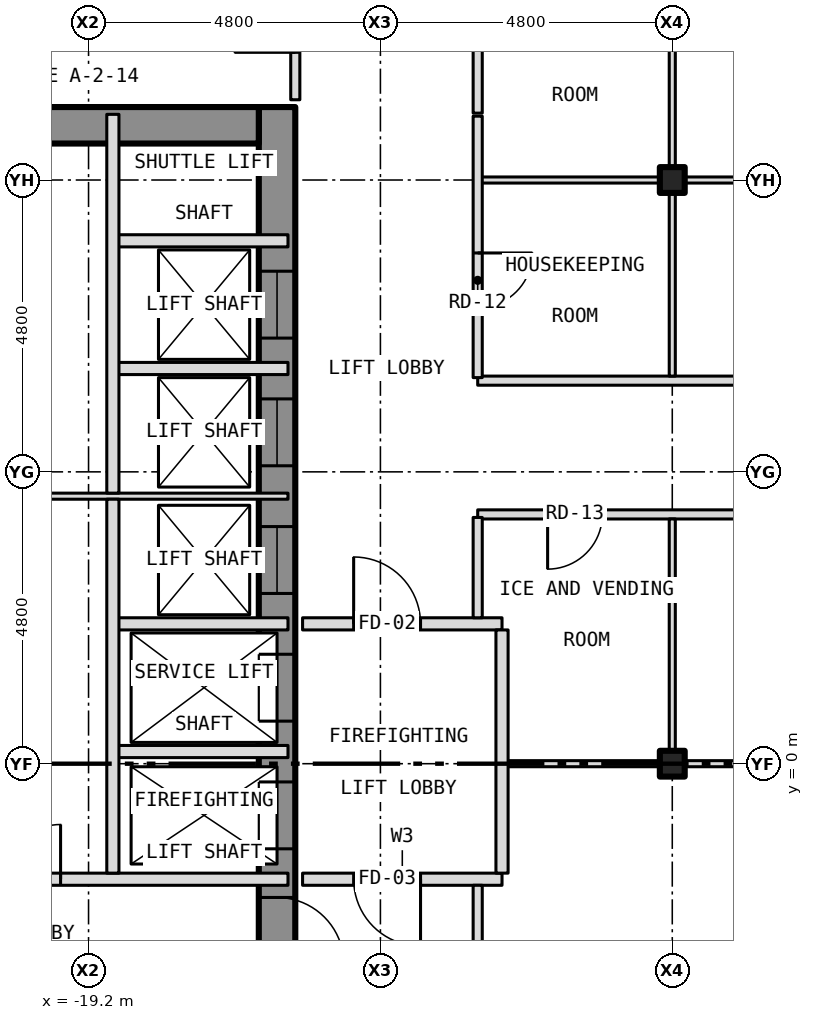
"""IFC4 building model, lengths in metres.
Left out: names, types, materials, properties, quantities, classifications, styles, units other than length and angle.
Written with IfcOpenShell. Run it as: python <this file> out.ifc"""

import sys

from ifc_helpers import new_model, si_unit, direction, frame, frame_2d, origin, origin_2d, place, context, subcontext, project, spatial, rectangle, i_section, extrude, element, fill, save


model = new_model("IFC4")
c1 = context("Model", 3, precision=1e-05, world=origin(), true_north=direction((0.0, 1.0)))
c2 = subcontext(c1, "Body", "Model", "MODEL_VIEW")
j1 = project(units=[si_unit("LENGTHUNIT", "METRE"), si_unit("PLANEANGLEUNIT", "RADIAN")], contexts=[c1])
p1 = place(None, origin())
s1 = spatial("IfcSite", under=j1, at=p1, CompositionType="ELEMENT")
p2 = place(p1, origin())
s2 = spatial("IfcBuilding", under=s1, at=p2, CompositionType="ELEMENT")
p3 = place(p2, frame((0.0, 0.0, 53.0)))
s3 = spatial("IfcBuildingStorey", under=s2, at=p3, CompositionType="ELEMENT", Elevation=53.0)
for number, where, z_axis, x_axis in (
    (1, (-9.6, 0.0, -0.15), (0.0, 0.0, 1.0), (1.0, 0.0, 0.0)),
    (2, (-9.6, 9.6, -0.15), (0.0, 0.0, 1.0), (1.0, 0.0, 0.0)),
):
    element("IfcColumn", number, at=place(p3, frame(where, z_axis=z_axis, x_axis=x_axis)), inside=s3, PredefinedType="COLUMN", context=c2, shape_type="SweptSolid", body=[
        extrude(i_section(OverallWidth=0.409, OverallDepth=0.424, WebThickness=0.033, FlangeThickness=0.052, at=origin_2d()), origin(), (0.0, 0.0, 1.0), 3.5),
    ])
p4 = place(p3, frame((-16.1, -10.8, 0.0), z_axis=(0.0, 0.0, 1.0), x_axis=(0.0, 1.0, 0.0)))
e3 = element("IfcWall", 3, at=p4, inside=s3, PredefinedType="SHEAR", context=c2, shape_type="SweptSolid", body=[
    extrude(rectangle(XDim=21.6, YDim=0.6, at=frame_2d((10.8, 0.0))), origin(), (0.0, 0.0, 1.0), 3.25),
])
p5 = place(p4, frame((9.4, 0.0, 0.0)))
e4 = element("IfcOpeningElement", 4, at=p5, cuts=e3, PredefinedType="OPENING", context=c2, shape_type="SweptSolid", body=[
    extrude(rectangle(XDim=1.1, YDim=2.1, at=frame_2d((0.55, 1.05))), frame((0.0, 0.312, 0.0), z_axis=(0.0, -1.0, 0.0), x_axis=(1.0, 0.0, 0.0)), (0.0, 0.0, 1.0), 0.624),
])
p6 = place(p4, frame((11.5, 0.0, 0.0)))
e5 = element("IfcOpeningElement", 5, at=p6, cuts=e3, PredefinedType="OPENING", context=c2, shape_type="SweptSolid", body=[
    extrude(rectangle(XDim=1.1, YDim=2.1, at=frame_2d((0.55, 1.05))), frame((0.0, 0.312, 0.0), z_axis=(0.0, -1.0, 0.0), x_axis=(1.0, 0.0, 0.0)), (0.0, 0.0, 1.0), 0.624),
])
p7 = place(p4, frame((13.6, 0.0, 0.0)))
e6 = element("IfcOpeningElement", 6, at=p7, cuts=e3, PredefinedType="OPENING", context=c2, shape_type="SweptSolid", body=[
    extrude(rectangle(XDim=1.1, YDim=2.1, at=frame_2d((0.55, 1.05))), frame((0.0, 0.312, 0.0), z_axis=(0.0, -1.0, 0.0), x_axis=(1.0, 0.0, 0.0)), (0.0, 0.0, 1.0), 0.624),
])
p8 = place(p4, frame((15.7, 0.0, 0.0)))
e7 = element("IfcOpeningElement", 7, at=p8, cuts=e3, PredefinedType="OPENING", context=c2, shape_type="SweptSolid", body=[
    extrude(rectangle(XDim=1.1, YDim=2.1, at=frame_2d((0.55, 1.05))), frame((0.0, 0.312, 0.0), z_axis=(0.0, -1.0, 0.0), x_axis=(1.0, 0.0, 0.0)), (0.0, 0.0, 1.0), 0.624),
])
p9 = place(p4, frame((17.8, 0.0, 0.0)))
e8 = element("IfcOpeningElement", 8, at=p9, cuts=e3, PredefinedType="OPENING", context=c2, shape_type="SweptSolid", body=[
    extrude(rectangle(XDim=1.1, YDim=2.1, at=frame_2d((0.55, 1.05))), frame((0.0, 0.312, 0.0), z_axis=(0.0, -1.0, 0.0), x_axis=(1.0, 0.0, 0.0)), (0.0, 0.0, 1.0), 0.624),
])
p10 = place(p4, frame((0.758, 0.0, 0.0)))
e9 = element("IfcOpeningElement", 9, at=p10, cuts=e3, PredefinedType="OPENING", context=c2, shape_type="SweptSolid", body=[
    extrude(rectangle(XDim=1.1, YDim=2.1, at=frame_2d((0.55, 1.05))), frame((0.0, 0.312, 0.0), z_axis=(0.0, -1.0, 0.0), x_axis=(1.0, 0.0, 0.0)), (0.0, 0.0, 1.0), 0.624),
])
p11 = place(p4, frame((7.5, 0.0, 0.0)))
e10 = element("IfcOpeningElement", 10, at=p11, cuts=e3, PredefinedType="OPENING", context=c2, shape_type="SweptSolid", body=[
    extrude(rectangle(XDim=1.1, YDim=2.1, at=frame_2d((0.55, 1.05))), frame((0.0, 0.312, 0.0), z_axis=(0.0, -1.0, 0.0), x_axis=(1.0, 0.0, 0.0)), (0.0, 0.0, 1.0), 0.624),
])
p12 = place(p3, frame((-23.4, 10.5, 0.0), z_axis=(0.0, 0.0, 1.0), x_axis=(1.0, 0.0, 0.0)))
e11 = element("IfcWall", 11, at=p12, inside=s3, PredefinedType="SHEAR", context=c2, shape_type="SweptSolid", body=[
    extrude(rectangle(XDim=7.0, YDim=0.6, at=frame_2d((3.5, 0.0))), origin(), (0.0, 0.0, 1.0), 3.25),
])
p13 = place(p3, frame((-23.88, -1.9, 0.0), z_axis=(0.0, 0.0, 1.0), x_axis=(1.0, 0.0, 0.0)))
e12 = element("IfcWall", 12, at=p13, inside=s3, PredefinedType="PARTITIONING", context=c2, shape_type="SweptSolid", body=[
    extrude(rectangle(XDim=7.96, YDim=0.2, at=frame_2d((3.98, 0.0))), origin(), (0.0, 0.0, 1.0), 3.25),
])
p14 = place(p13, frame((3.32, 0.0, 0.0)))
e13 = element("IfcOpeningElement", 13, at=p14, cuts=e12, PredefinedType="OPENING", context=c2, shape_type="SweptSolid", body=[
    extrude(rectangle(XDim=0.9, YDim=2.1, at=frame_2d((0.45, 1.05))), frame((0.0, 0.112, 0.0), z_axis=(0.0, -1.0, 0.0), x_axis=(1.0, 0.0, 0.0)), (0.0, 0.0, 1.0), 0.224),
])
p15 = place(p3, frame((-15.68, -1.9, 0.0), z_axis=(0.0, 0.0, 1.0), x_axis=(1.0, 0.0, 0.0)))
e14 = element("IfcWall", 14, at=p15, inside=s3, PredefinedType="PARTITIONING", context=c2, shape_type="SweptSolid", body=[
    extrude(rectangle(XDim=3.28, YDim=0.2, at=frame_2d((1.64, 0.0))), origin(), (0.0, 0.0, 1.0), 3.35),
])
p16 = place(p15, frame((0.84, 0.0, 0.0)))
e15 = element("IfcOpeningElement", 15, at=p16, cuts=e14, PredefinedType="OPENING", context=c2, shape_type="SweptSolid", body=[
    extrude(rectangle(XDim=1.1, YDim=2.1, at=frame_2d((0.55, 1.05))), frame((0.0, 0.112, 0.0), z_axis=(0.0, -1.0, 0.0), x_axis=(1.0, 0.0, 0.0)), (0.0, 0.0, 1.0), 0.224),
])
p17 = place(p3, frame((-12.4, 0.0, 0.0), z_axis=(0.0, 0.0, 1.0), x_axis=(1.0, 0.0, 0.0)))
e16 = element("IfcWall", 16, at=p17, inside=s3, PredefinedType="PARTITIONING", context=c2, shape_type="SweptSolid", body=[
    extrude(rectangle(XDim=2.596, YDim=0.1, at=frame_2d((1.298, 0.0))), origin(), (0.0, 0.0, 1.0), 2.728),
])
p18 = place(p3, frame((-9.804, 0.0, 0.0), z_axis=(0.0, 0.0, 1.0), x_axis=(1.0, 0.0, 0.0)))
e17 = element("IfcWall", 17, at=p18, inside=s3, PredefinedType="PARTITIONING", context=c2, shape_type="SweptSolid", body=[
    extrude(rectangle(XDim=0.408, YDim=0.1, at=frame_2d((0.204, 0.0))), origin(), (0.0, 0.0, 1.0), 3.35),
])
p19 = place(p3, frame((-9.396, 0.0, 0.0), z_axis=(0.0, 0.0, 1.0), x_axis=(1.0, 0.0, 0.0)))
e18 = element("IfcWall", 18, at=p19, inside=s3, PredefinedType="PARTITIONING", context=c2, shape_type="SweptSolid", body=[
    extrude(rectangle(XDim=9.192, YDim=0.1, at=frame_2d((4.596, 0.0))), origin(), (0.0, 0.0, 1.0), 2.728),
])
for number, where, z_axis, x_axis in (
    (19, (-18.8, 0.2, 0.0), (0.0, 0.0, 1.0), (1.0, 0.0, 0.0)),
    (20, (-18.8, 2.3, 0.0), (0.0, 0.0, 1.0), (1.0, 0.0, 0.0)),
):
    element("IfcWall", number, at=place(p3, frame(where, z_axis=z_axis, x_axis=x_axis)), inside=s3, PredefinedType="PARTITIONING", context=c2, shape_type="SweptSolid", body=[
        extrude(rectangle(XDim=2.88, YDim=0.2, at=frame_2d((1.44, 0.0))), origin(), (0.0, 0.0, 1.0), 3.25),
    ])
p20 = place(p3, frame((-15.68, 2.3, 0.0), z_axis=(0.0, 0.0, 1.0), x_axis=(1.0, 0.0, 0.0)))
e21 = element("IfcWall", 21, at=p20, inside=s3, PredefinedType="PARTITIONING", context=c2, shape_type="SweptSolid", body=[
    extrude(rectangle(XDim=3.28, YDim=0.2, at=frame_2d((1.64, 0.0))), origin(), (0.0, 0.0, 1.0), 3.35),
])
p21 = place(p20, frame((0.84, 0.0, 0.0)))
e22 = element("IfcOpeningElement", 22, at=p21, cuts=e21, PredefinedType="OPENING", context=c2, shape_type="SweptSolid", body=[
    extrude(rectangle(XDim=1.1, YDim=2.1, at=frame_2d((0.55, 1.05))), frame((0.0, 0.112, 0.0), z_axis=(0.0, -1.0, 0.0), x_axis=(1.0, 0.0, 0.0)), (0.0, 0.0, 1.0), 0.224),
])
p22 = place(p3, frame((-12.8, 4.1, 0.0), z_axis=(0.0, 0.0, 1.0), x_axis=(1.0, 0.0, 0.0)))
e23 = element("IfcWall", 23, at=p22, inside=s3, PredefinedType="PARTITIONING", context=c2, shape_type="SweptSolid", body=[
    extrude(rectangle(XDim=16.9, YDim=0.15, at=frame_2d((8.45, 0.0))), origin(), (0.0, 0.0, 1.0), 3.35),
])
p23 = place(p22, frame((1.15, 0.0, 0.0)))
e24 = element("IfcOpeningElement", 24, at=p23, cuts=e23, PredefinedType="OPENING", context=c2, shape_type="SweptSolid", body=[
    extrude(rectangle(XDim=0.9, YDim=2.1, at=frame_2d((0.45, 1.05))), frame((0.0, 0.087, 0.0), z_axis=(0.0, -1.0, 0.0), x_axis=(1.0, 0.0, 0.0)), (0.0, 0.0, 1.0), 0.174),
])
p24 = place(p22, frame((14.4, 0.0, 0.0)))
e25 = element("IfcOpeningElement", 25, at=p24, cuts=e23, PredefinedType="OPENING", context=c2, shape_type="SweptSolid", body=[
    extrude(rectangle(XDim=0.9, YDim=2.1, at=frame_2d((0.45, 1.05))), frame((0.0, 0.087, 0.0), z_axis=(0.0, -1.0, 0.0), x_axis=(1.0, 0.0, 0.0)), (0.0, 0.0, 1.0), 0.174),
])
p25 = place(p22, frame((7.55, 0.0, 0.0)))
e26 = element("IfcOpeningElement", 26, at=p25, cuts=e23, PredefinedType="OPENING", context=c2, shape_type="SweptSolid", body=[
    extrude(rectangle(XDim=0.9, YDim=2.1, at=frame_2d((0.45, 1.05))), frame((0.0, 0.087, 0.0), z_axis=(0.0, -1.0, 0.0), x_axis=(1.0, 0.0, 0.0)), (0.0, 0.0, 1.0), 0.174),
])
p26 = place(p3, frame((-23.88, 4.4, 0.0), z_axis=(0.0, 0.0, 1.0), x_axis=(1.0, 0.0, 0.0)))
e27 = element("IfcWall", 27, at=p26, inside=s3, PredefinedType="PARTITIONING", context=c2, shape_type="SweptSolid", body=[
    extrude(rectangle(XDim=7.96, YDim=0.1, at=frame_2d((3.98, 0.0))), origin(), (0.0, 0.0, 1.0), 3.25),
])
p27 = place(p26, frame((2.03, 0.0, 0.0)))
e28 = element("IfcOpeningElement", 28, at=p27, cuts=e27, PredefinedType="OPENING", context=c2, shape_type="SweptSolid", body=[
    extrude(rectangle(XDim=0.9, YDim=2.1, at=frame_2d((0.45, 1.05))), frame((0.0, 0.062, 0.0), z_axis=(0.0, -1.0, 0.0), x_axis=(1.0, 0.0, 0.0)), (0.0, 0.0, 1.0), 0.124),
])
p28 = place(p3, frame((-12.8, 6.3, 0.0), z_axis=(0.0, 0.0, 1.0), x_axis=(1.0, 0.0, 0.0)))
e29 = element("IfcWall", 29, at=p28, inside=s3, PredefinedType="PARTITIONING", context=c2, shape_type="SweptSolid", body=[
    extrude(rectangle(XDim=16.9, YDim=0.15, at=frame_2d((8.45, 0.0))), origin(), (0.0, 0.0, 1.0), 3.35),
])
p29 = place(p28, frame((14.4, 0.0, 0.0)))
e30 = element("IfcOpeningElement", 30, at=p29, cuts=e29, PredefinedType="OPENING", context=c2, shape_type="SweptSolid", body=[
    extrude(rectangle(XDim=0.9, YDim=2.1, at=frame_2d((0.45, 1.05))), frame((0.0, 0.087, 0.0), z_axis=(0.0, -1.0, 0.0), x_axis=(1.0, 0.0, 0.0)), (0.0, 0.0, 1.0), 0.174),
])
p30 = place(p28, frame((7.55, 0.0, 0.0)))
e31 = element("IfcOpeningElement", 31, at=p30, cuts=e29, PredefinedType="OPENING", context=c2, shape_type="SweptSolid", body=[
    extrude(rectangle(XDim=0.9, YDim=2.1, at=frame_2d((0.45, 1.05))), frame((0.0, 0.087, 0.0), z_axis=(0.0, -1.0, 0.0), x_axis=(1.0, 0.0, 0.0)), (0.0, 0.0, 1.0), 0.174),
])
for number, where, z_axis, x_axis in (
    (32, (-18.8, 6.5, 0.0), (0.0, 0.0, 1.0), (1.0, 0.0, 0.0)),
    (33, (-18.8, 8.6, 0.0), (0.0, 0.0, 1.0), (1.0, 0.0, 0.0)),
):
    element("IfcWall", number, at=place(p3, frame(where, z_axis=z_axis, x_axis=x_axis)), inside=s3, PredefinedType="PARTITIONING", context=c2, shape_type="SweptSolid", body=[
        extrude(rectangle(XDim=2.88, YDim=0.2, at=frame_2d((1.44, 0.0))), origin(), (0.0, 0.0, 1.0), 3.25),
    ])
p31 = place(p3, frame((-12.8, 9.6, 0.0), z_axis=(0.0, 0.0, 1.0), x_axis=(1.0, 0.0, 0.0)))
e34 = element("IfcWall", 34, at=p31, inside=s3, PredefinedType="PARTITIONING", context=c2, shape_type="SweptSolid", body=[
    extrude(rectangle(XDim=2.996, YDim=0.1, at=frame_2d((1.498, 0.0))), origin(), (0.0, 0.0, 1.0), 2.728),
])
p32 = place(p3, frame((-9.804, 9.6, 0.0), z_axis=(0.0, 0.0, 1.0), x_axis=(1.0, 0.0, 0.0)))
e35 = element("IfcWall", 35, at=p32, inside=s3, PredefinedType="PARTITIONING", context=c2, shape_type="SweptSolid", body=[
    extrude(rectangle(XDim=0.408, YDim=0.1, at=frame_2d((0.204, 0.0))), origin(), (0.0, 0.0, 1.0), 3.35),
])
p33 = place(p3, frame((-9.396, 9.6, 0.0), z_axis=(0.0, 0.0, 1.0), x_axis=(1.0, 0.0, 0.0)))
e36 = element("IfcWall", 36, at=p33, inside=s3, PredefinedType="PARTITIONING", context=c2, shape_type="SweptSolid", body=[
    extrude(rectangle(XDim=9.192, YDim=0.1, at=frame_2d((4.596, 0.0))), origin(), (0.0, 0.0, 1.0), 2.728),
])
p34 = place(p3, frame((-18.8, -1.8, 0.0), z_axis=(0.0, 0.0, 1.0), x_axis=(0.0, 1.0, 0.0)))
e37 = element("IfcWall", 37, at=p34, inside=s3, PredefinedType="PARTITIONING", context=c2, shape_type="SweptSolid", body=[
    extrude(rectangle(XDim=6.15, YDim=0.2, at=frame_2d((3.075, 0.0))), origin(), (0.0, 0.0, 1.0), 3.25),
])
p35 = place(p3, frame((-18.8, 4.45, 0.0), z_axis=(0.0, 0.0, 1.0), x_axis=(0.0, 1.0, 0.0)))
e38 = element("IfcWall", 38, at=p35, inside=s3, PredefinedType="PARTITIONING", context=c2, shape_type="SweptSolid", body=[
    extrude(rectangle(XDim=6.23, YDim=0.2, at=frame_2d((3.115, 0.0))), origin(), (0.0, 0.0, 1.0), 3.25),
])
p36 = place(p3, frame((-15.8, 10.92, 0.0), z_axis=(0.0, 0.0, 1.0), x_axis=(0.0, 1.0, 0.0)))
e39 = element("IfcWall", 39, at=p36, inside=s3, PredefinedType="PARTITIONING", context=c2, shape_type="SweptSolid", body=[
    extrude(rectangle(XDim=4.805, YDim=0.15, at=frame_2d((2.403, 0.0))), origin(), (0.0, 0.0, 1.0), 3.35),
])
p37 = place(p36, frame((0.78, 0.0, 0.0)))
e40 = element("IfcOpeningElement", 40, at=p37, cuts=e39, PredefinedType="OPENING", context=c2, shape_type="SweptSolid", body=[
    extrude(rectangle(XDim=1.0, YDim=2.1, at=frame_2d((0.5, 1.05))), frame((0.0, 0.087, 0.0), z_axis=(0.0, -1.0, 0.0), x_axis=(1.0, 0.0, 0.0)), (0.0, 0.0, 1.0), 0.174),
])
p38 = place(p3, frame((-12.8, -13.525, 0.0), z_axis=(0.0, 0.0, 1.0), x_axis=(0.0, 1.0, 0.0)))
e41 = element("IfcWall", 41, at=p38, inside=s3, PredefinedType="PARTITIONING", context=c2, shape_type="SweptSolid", body=[
    extrude(rectangle(XDim=11.525, YDim=0.15, at=frame_2d((5.762, 0.0))), origin(), (0.0, 0.0, 1.0), 3.35),
])
p39 = place(p38, frame((7.325, 0.0, 0.0)))
e42 = element("IfcOpeningElement", 42, at=p39, cuts=e41, PredefinedType="OPENING", context=c2, shape_type="SweptSolid", body=[
    extrude(rectangle(XDim=0.9, YDim=2.1, at=frame_2d((0.45, 1.05))), frame((0.0, 0.087, 0.0), z_axis=(0.0, -1.0, 0.0), x_axis=(1.0, 0.0, 0.0)), (0.0, 0.0, 1.0), 0.174),
])
p40 = place(p3, frame((-12.8, 2.4, 0.0), z_axis=(0.0, 0.0, 1.0), x_axis=(0.0, 1.0, 0.0)))
e43 = element("IfcWall", 43, at=p40, inside=s3, PredefinedType="PARTITIONING", context=c2, shape_type="SweptSolid", body=[
    extrude(rectangle(XDim=1.65, YDim=0.15, at=frame_2d((0.825, 0.0))), origin(), (0.0, 0.0, 1.0), 3.35),
])
p41 = place(p3, frame((-12.8, 6.35, 0.0), z_axis=(0.0, 0.0, 1.0), x_axis=(0.0, 1.0, 0.0)))
e44 = element("IfcWall", 44, at=p41, inside=s3, PredefinedType="PARTITIONING", context=c2, shape_type="SweptSolid", body=[
    extrude(rectangle(XDim=4.3, YDim=0.15, at=frame_2d((2.15, 0.0))), origin(), (0.0, 0.0, 1.0), 3.35),
])
p42 = place(p41, frame((1.15, 0.0, 0.0)))
e45 = element("IfcOpeningElement", 45, at=p42, cuts=e44, PredefinedType="OPENING", context=c2, shape_type="SweptSolid", body=[
    extrude(rectangle(XDim=0.9, YDim=2.1, at=frame_2d((0.45, 1.05))), frame((0.0, 0.087, 0.0), z_axis=(0.0, -1.0, 0.0), x_axis=(1.0, 0.0, 0.0)), (0.0, 0.0, 1.0), 0.174),
])
p43 = place(p3, frame((-12.8, 10.7, 0.0), z_axis=(0.0, 0.0, 1.0), x_axis=(0.0, 1.0, 0.0)))
e46 = element("IfcWall", 46, at=p43, inside=s3, PredefinedType="PARTITIONING", context=c2, shape_type="SweptSolid", body=[
    extrude(rectangle(XDim=2.825, YDim=0.15, at=frame_2d((1.413, 0.0))), origin(), (0.0, 0.0, 1.0), 3.35),
])
p44 = place(p3, frame((-12.4, -1.8, 0.0), z_axis=(0.0, 0.0, 1.0), x_axis=(0.0, 1.0, 0.0)))
e47 = element("IfcWall", 47, at=p44, inside=s3, PredefinedType="PARTITIONING", context=c2, shape_type="SweptSolid", body=[
    extrude(rectangle(XDim=4.0, YDim=0.2, at=frame_2d((2.0, 0.0))), origin(), (0.0, 0.0, 1.0), 3.35),
])
p45 = place(p3, frame((-9.6, 0.05, 0.0), z_axis=(0.0, 0.0, 1.0), x_axis=(0.0, 1.0, 0.0)))
e48 = element("IfcWall", 48, at=p45, inside=s3, PredefinedType="PARTITIONING", context=c2, shape_type="SweptSolid", body=[
    extrude(rectangle(XDim=3.975, YDim=0.1, at=frame_2d((1.987, 0.0))), origin(), (0.0, 0.0, 1.0), 2.728),
])
p46 = place(p3, frame((-9.6, 6.375, 0.0), z_axis=(0.0, 0.0, 1.0), x_axis=(0.0, 1.0, 0.0)))
e49 = element("IfcWall", 49, at=p46, inside=s3, PredefinedType="PARTITIONING", context=c2, shape_type="SweptSolid", body=[
    extrude(rectangle(XDim=3.175, YDim=0.1, at=frame_2d((1.587, 0.0))), origin(), (0.0, 0.0, 1.0), 2.728),
])
p47 = place(p3, frame((-9.6, 9.65, 0.0), z_axis=(0.0, 0.0, 1.0), x_axis=(0.0, 1.0, 0.0)))
e50 = element("IfcWall", 50, at=p47, inside=s3, PredefinedType="PARTITIONING", context=c2, shape_type="SweptSolid", body=[
    extrude(rectangle(XDim=3.875, YDim=0.1, at=frame_2d((1.938, 0.0))), origin(), (0.0, 0.0, 1.0), 2.728),
])
p48 = place(p5, origin())
e51 = element("IfcDoor", 51, at=p48, inside=s3, OperationType="SLIDING_TO_LEFT", PredefinedType="DOOR", context=c2, shape_type="SweptSolid", body=[
    extrude(rectangle(XDim=1.1, YDim=2.1, at=frame_2d((0.55, 1.05))), frame((0.0, 0.025, 0.0), z_axis=(0.0, -1.0, 0.0), x_axis=(1.0, 0.0, 0.0)), (0.0, 0.0, 1.0), 0.05),
])
fill(e4, e51)
p49 = place(p6, origin())
e52 = element("IfcDoor", 52, at=p49, inside=s3, OperationType="SLIDING_TO_LEFT", PredefinedType="DOOR", context=c2, shape_type="SweptSolid", body=[
    extrude(rectangle(XDim=1.1, YDim=2.1, at=frame_2d((0.55, 1.05))), frame((0.0, 0.025, 0.0), z_axis=(0.0, -1.0, 0.0), x_axis=(1.0, 0.0, 0.0)), (0.0, 0.0, 1.0), 0.05),
])
fill(e5, e52)
p50 = place(p7, origin())
e53 = element("IfcDoor", 53, at=p50, inside=s3, OperationType="SLIDING_TO_LEFT", PredefinedType="DOOR", context=c2, shape_type="SweptSolid", body=[
    extrude(rectangle(XDim=1.1, YDim=2.1, at=frame_2d((0.55, 1.05))), frame((0.0, 0.025, 0.0), z_axis=(0.0, -1.0, 0.0), x_axis=(1.0, 0.0, 0.0)), (0.0, 0.0, 1.0), 0.05),
])
fill(e6, e53)
p51 = place(p8, origin())
e54 = element("IfcDoor", 54, at=p51, inside=s3, OperationType="SLIDING_TO_LEFT", PredefinedType="DOOR", context=c2, shape_type="SweptSolid", body=[
    extrude(rectangle(XDim=1.1, YDim=2.1, at=frame_2d((0.55, 1.05))), frame((0.0, 0.025, 0.0), z_axis=(0.0, -1.0, 0.0), x_axis=(1.0, 0.0, 0.0)), (0.0, 0.0, 1.0), 0.05),
])
fill(e7, e54)
p52 = place(p9, origin())
e55 = element("IfcDoor", 55, at=p52, inside=s3, OperationType="SLIDING_TO_LEFT", PredefinedType="DOOR", context=c2, shape_type="SweptSolid", body=[
    extrude(rectangle(XDim=1.1, YDim=2.1, at=frame_2d((0.55, 1.05))), frame((0.0, 0.025, 0.0), z_axis=(0.0, -1.0, 0.0), x_axis=(1.0, 0.0, 0.0)), (0.0, 0.0, 1.0), 0.05),
])
fill(e8, e55)
p53 = place(p11, origin())
e56 = element("IfcDoor", 56, at=p53, inside=s3, OperationType="SINGLE_SWING_LEFT", PredefinedType="DOOR", context=c2, shape_type="SweptSolid", body=[
    extrude(rectangle(XDim=1.1, YDim=2.1, at=frame_2d((0.55, 1.05))), frame((0.0, 0.025, 0.0), z_axis=(0.0, -1.0, 0.0), x_axis=(1.0, 0.0, 0.0)), (0.0, 0.0, 1.0), 0.05),
])
fill(e10, e56)
p54 = place(p14, origin())
e57 = element("IfcDoor", 57, at=p54, inside=s3, OperationType="SINGLE_SWING_RIGHT", PredefinedType="DOOR", context=c2, shape_type="SweptSolid", body=[
    extrude(rectangle(XDim=0.9, YDim=2.1, at=frame_2d((0.45, 1.05))), frame((0.0, 0.025, 0.0), z_axis=(0.0, -1.0, 0.0), x_axis=(1.0, 0.0, 0.0)), (0.0, 0.0, 1.0), 0.05),
])
fill(e13, e57)
p55 = place(p21, origin())
e58 = element("IfcDoor", 58, at=p55, inside=s3, OperationType="SINGLE_SWING_LEFT", PredefinedType="DOOR", context=c2, shape_type="SweptSolid", body=[
    extrude(rectangle(XDim=1.1, YDim=2.1, at=frame_2d((0.55, 1.05))), frame((0.0, 0.025, 0.0), z_axis=(0.0, -1.0, 0.0), x_axis=(1.0, 0.0, 0.0)), (0.0, 0.0, 1.0), 0.05),
])
fill(e22, e58)
p56 = place(p16, origin())
e59 = element("IfcDoor", 59, at=p56, inside=s3, OperationType="SINGLE_SWING_RIGHT", PredefinedType="DOOR", context=c2, shape_type="SweptSolid", body=[
    extrude(rectangle(XDim=1.1, YDim=2.1, at=frame_2d((0.55, 1.05))), frame((0.0, 0.025, 0.0), z_axis=(0.0, -1.0, 0.0), x_axis=(1.0, 0.0, 0.0)), (0.0, 0.0, 1.0), 0.05),
])
fill(e15, e59)
p57 = place(p42, origin())
e60 = element("IfcDoor", 60, at=p57, inside=s3, OperationType="SINGLE_SWING_RIGHT", PredefinedType="DOOR", context=c2, shape_type="SweptSolid", body=[
    extrude(rectangle(XDim=0.9, YDim=2.1, at=frame_2d((0.45, 1.05))), frame((0.0, 0.025, 0.0), z_axis=(0.0, -1.0, 0.0), x_axis=(1.0, 0.0, 0.0)), (0.0, 0.0, 1.0), 0.05),
])
fill(e45, e60)
p58 = place(p23, origin())
e61 = element("IfcDoor", 61, at=p58, inside=s3, OperationType="SINGLE_SWING_LEFT", PredefinedType="DOOR", context=c2, shape_type="SweptSolid", body=[
    extrude(rectangle(XDim=0.9, YDim=2.1, at=frame_2d((0.45, 1.05))), frame((0.0, 0.025, 0.0), z_axis=(0.0, -1.0, 0.0), x_axis=(1.0, 0.0, 0.0)), (0.0, 0.0, 1.0), 0.05),
])
fill(e24, e61)
save(model, sys.argv[1])
